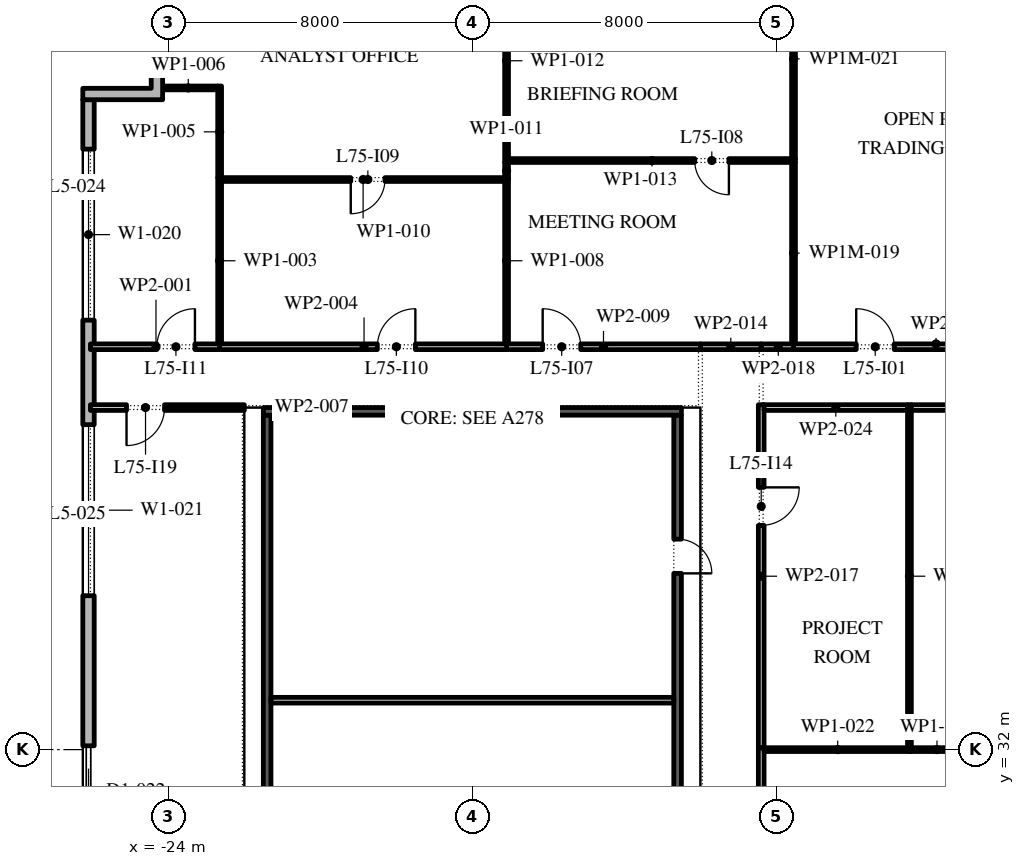
"""IFC4 building model, lengths in metres.
Left out: names, types, materials, properties, quantities, classifications, styles, units other than length and angle.
Written with IfcOpenShell. Run it as: python <this file> out.ifc"""

import sys

from ifc_helpers import new_model, si_unit, direction, frame, frame_2d, origin, place, context, subcontext, project, spatial, polyline, rectangle, outline, extrude, element, fill, save


model = new_model("IFC4")
c1 = context("Model", 3, precision=1e-05, world=origin(), true_north=direction((0.0, 1.0)))
c2 = subcontext(c1, "Body", "Model", "MODEL_VIEW")
j1 = project(units=[si_unit("LENGTHUNIT", "METRE"), si_unit("PLANEANGLEUNIT", "RADIAN")], contexts=[c1])
p1 = place(None, origin())
s1 = spatial("IfcSite", under=j1, at=p1, CompositionType="ELEMENT")
p2 = place(p1, origin())
s2 = spatial("IfcBuilding", under=s1, at=p2, CompositionType="ELEMENT")
p3 = place(p2, frame((0.0, 0.0, 342.6)))
s3 = spatial("IfcBuildingStorey", under=s2, at=p3, CompositionType="ELEMENT", Elevation=342.6)
p4 = place(p3, frame((-26.1, 49.1, 0.0), z_axis=(0.0, 0.0, 1.0), x_axis=(0.0, -1.0, 0.0)))
e1 = element("IfcWall", 1, at=p4, inside=s3, PredefinedType="STANDARD", context=c2, shape_type="SweptSolid", body=[
    extrude(rectangle(XDim=51.5, YDim=0.3, at=frame_2d((25.75, 0.0))), origin(), (0.0, 0.0, 1.0), 4.0),
])
p5 = place(p4, frame((1.3, 0.0, 0.45)))
e2 = element("IfcOpeningElement", 2, at=p5, cuts=e1, PredefinedType="OPENING", context=c2, shape_type="SweptSolid", body=[
    extrude(rectangle(XDim=4.5, YDim=3.05, at=frame_2d((2.25, 1.525))), frame((0.0, 0.16, 0.0), z_axis=(0.0, -1.0, 0.0), x_axis=(1.0, 0.0, 0.0)), (0.0, 0.0, 1.0), 0.32),
])
p6 = place(p4, frame((8.55, 0.0, 0.45)))
e3 = element("IfcOpeningElement", 3, at=p6, cuts=e1, PredefinedType="OPENING", context=c2, shape_type="SweptSolid", body=[
    extrude(rectangle(XDim=4.5, YDim=3.05, at=frame_2d((2.25, 1.525))), frame((0.0, 0.16, 0.0), z_axis=(0.0, -1.0, 0.0), x_axis=(1.0, 0.0, 0.0)), (0.0, 0.0, 1.0), 0.32),
])
p7 = place(p4, frame((17.0, 0.0, 0.0)))
e4 = element("IfcOpeningElement", 4, at=p7, cuts=e1, PredefinedType="OPENING", context=c2, shape_type="SweptSolid", body=[
    extrude(rectangle(XDim=2.4, YDim=3.5, at=frame_2d((1.2, 1.75))), frame((0.0, 0.16, 0.0), z_axis=(0.0, -1.0, 0.0), x_axis=(1.0, 0.0, 0.0)), (0.0, 0.0, 1.0), 0.32),
])
p8 = place(p4, frame((23.35, 0.0, 0.45)))
e5 = element("IfcOpeningElement", 5, at=p8, cuts=e1, PredefinedType="OPENING", context=c2, shape_type="SweptSolid", body=[
    extrude(rectangle(XDim=4.5, YDim=3.05, at=frame_2d((2.25, 1.525))), frame((0.0, 0.16, 0.0), z_axis=(0.0, -1.0, 0.0), x_axis=(1.0, 0.0, 0.0)), (0.0, 0.0, 1.0), 0.32),
])
p9 = place(p4, frame((30.75, 0.0, 0.45)))
e6 = element("IfcOpeningElement", 6, at=p9, cuts=e1, PredefinedType="OPENING", context=c2, shape_type="SweptSolid", body=[
    extrude(rectangle(XDim=4.5, YDim=3.05, at=frame_2d((2.25, 1.525))), frame((0.0, 0.16, 0.0), z_axis=(0.0, -1.0, 0.0), x_axis=(1.0, 0.0, 0.0)), (0.0, 0.0, 1.0), 0.32),
])
p10 = place(p4, frame((38.15, 0.0, 0.45)))
e7 = element("IfcOpeningElement", 7, at=p10, cuts=e1, PredefinedType="OPENING", context=c2, shape_type="SweptSolid", body=[
    extrude(rectangle(XDim=4.5, YDim=3.05, at=frame_2d((2.25, 1.525))), frame((0.0, 0.16, 0.0), z_axis=(0.0, -1.0, 0.0), x_axis=(1.0, 0.0, 0.0)), (0.0, 0.0, 1.0), 0.32),
])
p11 = place(p4, frame((46.6, 0.0, 0.0)))
e8 = element("IfcOpeningElement", 8, at=p11, cuts=e1, PredefinedType="OPENING", context=c2, shape_type="SweptSolid", body=[
    extrude(rectangle(XDim=2.4, YDim=3.5, at=frame_2d((1.2, 1.75))), frame((0.0, 0.16, 0.0), z_axis=(0.0, -1.0, 0.0), x_axis=(1.0, 0.0, 0.0)), (0.0, 0.0, 1.0), 0.32),
])
p12 = place(p3, origin())
e9 = element("IfcWall", 9, at=p12, inside=s3, PredefinedType="STANDARD", context=c2, shape_type="SweptSolid", body=[
    extrude(outline(polyline([(-24.45, 49.4), (-24.45, 51.2), (-22.65, 51.2), (-22.65, 52.7), (-22.35, 52.7), (-22.35, 50.9), (-24.15, 50.9), (-24.15, 49.1), (-26.25, 49.1), (-26.25, 49.4), (-24.45, 49.4)])), origin(), (0.0, 0.0, 1.0), 4.0),
])
p13 = place(p3, frame((-21.4, 25.75, 0.0), z_axis=(0.0, 0.0, 1.0), x_axis=(0.0, 1.0, 0.0)))
e10 = element("IfcWall", 10, at=p13, inside=s3, PredefinedType="SHEAR", context=c2, shape_type="SweptSolid", body=[
    extrude(rectangle(XDim=15.05, YDim=0.2, at=frame_2d((7.525, 0.0))), origin(), (0.0, 0.0, 1.0), 4.0),
])
p14 = place(p3, frame((-10.6, 25.75, 0.0), z_axis=(0.0, 0.0, 1.0), x_axis=(0.0, 1.0, 0.0)))
e11 = element("IfcWall", 11, at=p14, inside=s3, PredefinedType="SHEAR", context=c2, shape_type="SweptSolid", body=[
    extrude(rectangle(XDim=15.05, YDim=0.2, at=frame_2d((7.525, 0.0))), origin(), (0.0, 0.0, 1.0), 4.0),
])
p15 = place(p14, frame((3.288, 0.0, 0.0)))
e12 = element("IfcOpeningElement", 12, at=p15, cuts=e11, PredefinedType="OPENING", context=c2, shape_type="SweptSolid", body=[
    extrude(rectangle(XDim=0.9, YDim=2.1, at=frame_2d((0.45, 1.05))), frame((0.0, 0.11, 0.0), z_axis=(0.0, -1.0, 0.0), x_axis=(1.0, 0.0, 0.0)), (0.0, 0.0, 1.0), 0.22),
])
p16 = place(p14, frame((10.887, 0.0, 0.0)))
e13 = element("IfcOpeningElement", 13, at=p16, cuts=e11, PredefinedType="OPENING", context=c2, shape_type="SweptSolid", body=[
    extrude(rectangle(XDim=0.9, YDim=2.1, at=frame_2d((0.45, 1.05))), frame((0.0, 0.11, 0.0), z_axis=(0.0, -1.0, 0.0), x_axis=(1.0, 0.0, 0.0)), (0.0, 0.0, 1.0), 0.22),
])
p17 = place(p3, frame((-21.5, 40.9, 0.0), z_axis=(0.0, 0.0, 1.0), x_axis=(1.0, 0.0, 0.0)))
e14 = element("IfcWall", 14, at=p17, inside=s3, PredefinedType="SHEAR", context=c2, shape_type="SweptSolid", body=[
    extrude(rectangle(XDim=11.0, YDim=0.2, at=frame_2d((5.5, 0.0))), origin(), (0.0, 0.0, 1.0), 4.0),
])
p18 = place(p3, frame((-21.3, 33.3, 0.0), z_axis=(0.0, 0.0, 1.0), x_axis=(1.0, 0.0, 0.0)))
e15 = element("IfcWall", 15, at=p18, inside=s3, PredefinedType="PARTITIONING", context=c2, shape_type="SweptSolid", body=[
    extrude(rectangle(XDim=10.6, YDim=0.15, at=frame_2d((5.3, 0.0))), origin(), (0.0, 0.0, 1.0), 4.0),
])
p19 = place(p3, frame((-26.05, 42.6, 0.0), z_axis=(0.0, 0.0, 1.0), x_axis=(1.0, 0.0, 0.0)))
e16 = element("IfcWall", 16, at=p19, inside=s3, PredefinedType="PARTITIONING", context=c2, shape_type="SweptSolid", body=[
    extrude(rectangle(XDim=3.45, YDim=0.15, at=frame_2d((1.725, 0.0))), origin(), (0.0, 0.0, 1.0), 4.0),
])
p20 = place(p19, frame((1.75, 0.0, 0.0)))
e17 = element("IfcOpeningElement", 17, at=p20, cuts=e16, PredefinedType="OPENING", context=c2, shape_type="SweptSolid", body=[
    extrude(rectangle(XDim=1.0, YDim=2.1, at=frame_2d((0.5, 1.05))), frame((0.0, 0.085, 0.0), z_axis=(0.0, -1.0, 0.0), x_axis=(1.0, 0.0, 0.0)), (0.0, 0.0, 1.0), 0.17),
])
p21 = place(p3, frame((-22.65, 42.675, 0.0), z_axis=(0.0, 0.0, 1.0), x_axis=(0.0, 1.0, 0.0)))
e18 = element("IfcWall", 18, at=p21, inside=s3, PredefinedType="PARTITIONING", context=c2, shape_type="SweptSolid", body=[
    extrude(rectangle(XDim=4.375, YDim=0.1, at=frame_2d((2.188, 0.0))), origin(), (0.0, 0.0, 1.0), 4.0),
])
p22 = place(p3, frame((-22.65, 42.6, 0.0), z_axis=(0.0, 0.0, 1.0), x_axis=(1.0, 0.0, 0.0)))
e19 = element("IfcWall", 19, at=p22, inside=s3, PredefinedType="PARTITIONING", context=c2, shape_type="SweptSolid", body=[
    extrude(rectangle(XDim=7.6, YDim=0.15, at=frame_2d((3.8, 0.0))), origin(), (0.0, 0.0, 1.0), 4.0),
])
p23 = place(p22, frame((4.15, 0.0, 0.0)))
e20 = element("IfcOpeningElement", 20, at=p23, cuts=e19, PredefinedType="OPENING", context=c2, shape_type="SweptSolid", body=[
    extrude(rectangle(XDim=1.0, YDim=2.1, at=frame_2d((0.5, 1.05))), frame((0.0, 0.085, 0.0), z_axis=(0.0, -1.0, 0.0), x_axis=(1.0, 0.0, 0.0)), (0.0, 0.0, 1.0), 0.17),
])
p24 = place(p3, frame((-22.65, 47.05, 0.0), z_axis=(0.0, 0.0, 1.0), x_axis=(0.0, 1.0, 0.0)))
e21 = element("IfcWall", 21, at=p24, inside=s3, PredefinedType="PARTITIONING", context=c2, shape_type="SweptSolid", body=[
    extrude(rectangle(XDim=2.41, YDim=0.1, at=frame_2d((1.205, 0.0))), origin(), (0.0, 0.0, 1.0), 4.0),
])
p25 = place(p3, frame((-22.7, 49.41, 0.0), z_axis=(0.0, 0.0, 1.0), x_axis=(-1.0, 0.0, 0.0)))
e22 = element("IfcWall", 22, at=p25, inside=s3, PredefinedType="PARTITIONING", context=c2, shape_type="SweptSolid", body=[
    extrude(rectangle(XDim=1.55, YDim=0.1, at=frame_2d((0.775, 0.0))), origin(), (0.0, 0.0, 1.0), 4.0),
])
p26 = place(p3, frame((-22.0, 41.0, 0.0), z_axis=(0.0, 0.0, 1.0), x_axis=(-1.0, 0.0, 0.0)))
e23 = element("IfcWall", 23, at=p26, inside=s3, PredefinedType="PARTITIONING", context=c2, shape_type="SweptSolid", body=[
    extrude(rectangle(XDim=4.05, YDim=0.15, at=frame_2d((2.025, 0.0))), origin(), (0.0, 0.0, 1.0), 4.0),
])
p27 = place(p26, frame((2.1, 0.0, 0.0)))
e24 = element("IfcOpeningElement", 24, at=p27, cuts=e23, PredefinedType="OPENING", context=c2, shape_type="SweptSolid", body=[
    extrude(rectangle(XDim=1.0, YDim=2.1, at=frame_2d((0.5, 1.05))), frame((0.0, 0.085, 0.0), z_axis=(0.0, -1.0, 0.0), x_axis=(1.0, 0.0, 0.0)), (0.0, 0.0, 1.0), 0.17),
])
p28 = place(p3, frame((-15.1, 42.675, 0.0), z_axis=(0.0, 0.0, 1.0), x_axis=(0.0, 1.0, 0.0)))
e25 = element("IfcWall", 25, at=p28, inside=s3, PredefinedType="PARTITIONING", context=c2, shape_type="SweptSolid", body=[
    extrude(rectangle(XDim=4.375, YDim=0.1, at=frame_2d((2.188, 0.0))), origin(), (0.0, 0.0, 1.0), 4.0),
])
p29 = place(p3, frame((-15.1, 42.6, 0.0), z_axis=(0.0, 0.0, 1.0), x_axis=(1.0, 0.0, 0.0)))
e26 = element("IfcWall", 26, at=p29, inside=s3, PredefinedType="PARTITIONING", context=c2, shape_type="SweptSolid", body=[
    extrude(rectangle(XDim=5.1, YDim=0.15, at=frame_2d((2.55, 0.0))), origin(), (0.0, 0.0, 1.0), 4.0),
])
p30 = place(p29, frame((0.95, 0.0, 0.0)))
e27 = element("IfcOpeningElement", 27, at=p30, cuts=e26, PredefinedType="OPENING", context=c2, shape_type="SweptSolid", body=[
    extrude(rectangle(XDim=1.0, YDim=2.1, at=frame_2d((0.5, 1.05))), frame((0.0, 0.085, 0.0), z_axis=(0.0, -1.0, 0.0), x_axis=(1.0, 0.0, 0.0)), (0.0, 0.0, 1.0), 0.17),
])
p31 = place(p3, frame((-15.15, 47.0, 0.0), z_axis=(0.0, 0.0, 1.0), x_axis=(-1.0, 0.0, 0.0)))
e28 = element("IfcWall", 28, at=p31, inside=s3, PredefinedType="PARTITIONING", context=c2, shape_type="SweptSolid", body=[
    extrude(rectangle(XDim=7.45, YDim=0.1, at=frame_2d((3.725, 0.0))), origin(), (0.0, 0.0, 1.0), 4.0),
])
p32 = place(p31, frame((3.15, 0.0, 0.0)))
e29 = element("IfcOpeningElement", 29, at=p32, cuts=e28, PredefinedType="OPENING", context=c2, shape_type="SweptSolid", body=[
    extrude(rectangle(XDim=0.9, YDim=2.1, at=frame_2d((0.45, 1.05))), frame((0.0, 0.06, 0.0), z_axis=(0.0, -1.0, 0.0), x_axis=(1.0, 0.0, 0.0)), (0.0, 0.0, 1.0), 0.12),
])
p33 = place(p3, frame((-15.1, 47.0, 0.0), z_axis=(0.0, 0.0, 1.0), x_axis=(0.0, 1.0, 0.0)))
e30 = element("IfcWall", 30, at=p33, inside=s3, PredefinedType="PARTITIONING", context=c2, shape_type="SweptSolid", body=[
    extrude(rectangle(XDim=0.45, YDim=0.1, at=frame_2d((0.225, 0.0))), origin(), (0.0, 0.0, 1.0), 4.0),
])
p34 = place(p3, frame((-15.1, 47.45, 0.0), z_axis=(0.0, 0.0, 1.0), x_axis=(0.0, 1.0, 0.0)))
e31 = element("IfcWall", 31, at=p34, inside=s3, PredefinedType="PARTITIONING", context=c2, shape_type="SweptSolid", body=[
    extrude(rectangle(XDim=5.35, YDim=0.1, at=frame_2d((2.675, 0.0))), origin(), (0.0, 0.0, 1.0), 4.0),
])
p35 = place(p3, frame((-15.05, 47.5, 0.0), z_axis=(0.0, 0.0, 1.0), x_axis=(1.0, 0.0, 0.0)))
e32 = element("IfcWall", 32, at=p35, inside=s3, PredefinedType="PARTITIONING", context=c2, shape_type="SweptSolid", body=[
    extrude(rectangle(XDim=7.55, YDim=0.1, at=frame_2d((3.775, 0.0))), origin(), (0.0, 0.0, 1.0), 4.0),
])
p36 = place(p35, frame((4.9, 0.0, 0.0)))
e33 = element("IfcOpeningElement", 33, at=p36, cuts=e32, PredefinedType="OPENING", context=c2, shape_type="SweptSolid", body=[
    extrude(rectangle(XDim=0.9, YDim=2.1, at=frame_2d((0.45, 1.05))), frame((0.0, 0.06, 0.0), z_axis=(0.0, -1.0, 0.0), x_axis=(1.0, 0.0, 0.0)), (0.0, 0.0, 1.0), 0.12),
])
p37 = place(p3, frame((-10.0, 42.6, 0.0), z_axis=(0.0, 0.0, 1.0), x_axis=(1.0, 0.0, 0.0)))
e34 = element("IfcWall", 34, at=p37, inside=s3, PredefinedType="PARTITIONING", context=c2, shape_type="SweptSolid", body=[
    extrude(rectangle(XDim=1.6, YDim=0.15, at=frame_2d((0.8, 0.0))), origin(), (0.0, 0.0, 1.0), 4.0),
])
p38 = place(p3, frame((-8.4, 32.05, 0.0), z_axis=(0.0, 0.0, 1.0), x_axis=(0.0, -1.0, 0.0)))
e35 = element("IfcWall", 35, at=p38, inside=s3, PredefinedType="PARTITIONING", context=c2, shape_type="SweptSolid", body=[
    extrude(rectangle(XDim=12.975, YDim=0.15, at=frame_2d((6.488, 0.0))), origin(), (0.0, 0.0, 1.0), 4.0),
])
p39 = place(p38, frame((3.4, 0.0, 0.0)))
e36 = element("IfcOpeningElement", 36, at=p39, cuts=e35, PredefinedType="OPENING", context=c2, shape_type="SweptSolid", body=[
    extrude(rectangle(XDim=1.0, YDim=2.1, at=frame_2d((0.5, 1.05))), frame((0.0, 0.085, 0.0), z_axis=(0.0, -1.0, 0.0), x_axis=(1.0, 0.0, 0.0)), (0.0, 0.0, 1.0), 0.17),
])
p40 = place(p3, frame((-8.4, 41.075, 0.0), z_axis=(0.0, 0.0, 1.0), x_axis=(0.0, -1.0, 0.0)))
e37 = element("IfcWall", 37, at=p40, inside=s3, PredefinedType="PARTITIONING", context=c2, shape_type="SweptSolid", body=[
    extrude(rectangle(XDim=9.025, YDim=0.15, at=frame_2d((4.512, 0.0))), origin(), (0.0, 0.0, 1.0), 4.0),
])
p41 = place(p40, frame((2.175, 0.0, 0.0)))
e38 = element("IfcOpeningElement", 38, at=p41, cuts=e37, PredefinedType="OPENING", context=c2, shape_type="SweptSolid", body=[
    extrude(rectangle(XDim=1.0, YDim=2.1, at=frame_2d((0.5, 1.05))), frame((0.0, 0.085, 0.0), z_axis=(0.0, -1.0, 0.0), x_axis=(1.0, 0.0, 0.0)), (0.0, 0.0, 1.0), 0.17),
])
p42 = place(p3, frame((-8.4, 42.6, 0.0), z_axis=(0.0, 0.0, 1.0), x_axis=(1.0, 0.0, 0.0)))
e39 = element("IfcWall", 39, at=p42, inside=s3, PredefinedType="PARTITIONING", context=c2, shape_type="SweptSolid", body=[
    extrude(rectangle(XDim=0.9, YDim=0.15, at=frame_2d((0.45, 0.0))), origin(), (0.0, 0.0, 1.0), 4.0),
])
p43 = place(p3, frame((-7.55, 42.675, 0.0), z_axis=(0.0, 0.0, 1.0), x_axis=(0.0, 1.0, 0.0)))
e40 = element("IfcWall", 40, at=p43, inside=s3, PredefinedType="PARTITIONING", context=c2, shape_type="SweptSolid", body=[
    extrude(rectangle(XDim=4.775, YDim=0.1, at=frame_2d((2.387, 0.0))), origin(), (0.0, 0.0, 1.0), 3.096),
])
p44 = place(p3, frame((-7.55, 42.6, 0.0), z_axis=(0.0, 0.0, 1.0), x_axis=(1.0, 0.0, 0.0)))
e41 = element("IfcWall", 41, at=p44, inside=s3, PredefinedType="PARTITIONING", context=c2, shape_type="SweptSolid", body=[
    extrude(rectangle(XDim=7.5, YDim=0.15, at=frame_2d((3.75, 0.0))), origin(), (0.0, 0.0, 1.0), 4.0),
])
p45 = place(p44, frame((1.65, 0.0, 0.0)))
e42 = element("IfcOpeningElement", 42, at=p45, cuts=e41, PredefinedType="OPENING", context=c2, shape_type="SweptSolid", body=[
    extrude(rectangle(XDim=1.0, YDim=2.1, at=frame_2d((0.5, 1.05))), frame((0.0, 0.085, 0.0), z_axis=(0.0, -1.0, 0.0), x_axis=(1.0, 0.0, 0.0)), (0.0, 0.0, 1.0), 0.17),
])
p46 = place(p3, frame((-7.55, 47.55, 0.0), z_axis=(0.0, 0.0, 1.0), x_axis=(0.0, 1.0, 0.0)))
e43 = element("IfcWall", 43, at=p46, inside=s3, PredefinedType="PARTITIONING", context=c2, shape_type="SweptSolid", body=[
    extrude(rectangle(XDim=5.25, YDim=0.1, at=frame_2d((2.625, 0.0))), origin(), (0.0, 0.0, 1.0), 3.096),
])
p47 = place(p3, frame((-4.45, 32.0, 0.0), z_axis=(0.0, 0.0, 1.0), x_axis=(-1.0, 0.0, 0.0)))
e44 = element("IfcWall", 44, at=p47, inside=s3, PredefinedType="PARTITIONING", context=c2, shape_type="SweptSolid", body=[
    extrude(rectangle(XDim=3.875, YDim=0.1, at=frame_2d((1.938, 0.0))), origin(), (0.0, 0.0, 1.0), 4.0),
])
p48 = place(p3, frame((-4.5, 32.05, 0.0), z_axis=(0.0, 0.0, 1.0), x_axis=(0.0, 1.0, 0.0)))
e45 = element("IfcWall", 45, at=p48, inside=s3, PredefinedType="PARTITIONING", context=c2, shape_type="SweptSolid", body=[
    extrude(rectangle(XDim=9.025, YDim=0.1, at=frame_2d((4.512, 0.0))), origin(), (0.0, 0.0, 1.0), 4.0),
])
p49 = place(p3, frame((-4.55, 41.0, 0.0), z_axis=(0.0, 0.0, 1.0), x_axis=(-1.0, 0.0, 0.0)))
e46 = element("IfcWall", 46, at=p49, inside=s3, PredefinedType="PARTITIONING", context=c2, shape_type="SweptSolid", body=[
    extrude(rectangle(XDim=3.775, YDim=0.15, at=frame_2d((1.887, 0.0))), origin(), (0.0, 0.0, 1.0), 4.0),
])
p50 = place(p3, frame((-3.05, 32.0, 0.0), z_axis=(0.0, 0.0, 1.0), x_axis=(-1.0, 0.0, 0.0)))
e47 = element("IfcWall", 47, at=p50, inside=s3, PredefinedType="PARTITIONING", context=c2, shape_type="SweptSolid", body=[
    extrude(rectangle(XDim=1.45, YDim=0.1, at=frame_2d((0.725, 0.0))), origin(), (0.0, 0.0, 1.0), 4.0),
])
p51 = place(p3, frame((1.45, 41.0, 0.0), z_axis=(0.0, 0.0, 1.0), x_axis=(-1.0, 0.0, 0.0)))
e48 = element("IfcWall", 48, at=p51, inside=s3, PredefinedType="PARTITIONING", context=c2, shape_type="SweptSolid", body=[
    extrude(rectangle(XDim=5.9, YDim=0.15, at=frame_2d((2.95, 0.0))), origin(), (0.0, 0.0, 1.0), 4.0),
])
p52 = place(p51, frame((1.3, 0.0, 0.0)))
e49 = element("IfcOpeningElement", 49, at=p52, cuts=e48, PredefinedType="OPENING", context=c2, shape_type="SweptSolid", body=[
    extrude(rectangle(XDim=1.0, YDim=2.1, at=frame_2d((0.5, 1.05))), frame((0.0, 0.085, 0.0), z_axis=(0.0, -1.0, 0.0), x_axis=(1.0, 0.0, 0.0)), (0.0, 0.0, 1.0), 0.17),
])
p53 = place(p5, origin())
e50 = element("IfcWindow", 50, at=p53, inside=s3, PartitioningType="DOUBLE_PANEL_VERTICAL", PredefinedType="WINDOW", context=c2, shape_type="SweptSolid", body=[
    extrude(rectangle(XDim=4.5, YDim=3.05, at=frame_2d((2.25, 1.525))), frame((0.0, 0.03, 0.0), z_axis=(0.0, -1.0, 0.0), x_axis=(1.0, 0.0, 0.0)), (0.0, 0.0, 1.0), 0.06),
])
fill(e2, e50)
p54 = place(p6, origin())
e51 = element("IfcWindow", 51, at=p54, inside=s3, PartitioningType="DOUBLE_PANEL_VERTICAL", PredefinedType="WINDOW", context=c2, shape_type="SweptSolid", body=[
    extrude(rectangle(XDim=4.5, YDim=3.05, at=frame_2d((2.25, 1.525))), frame((0.0, 0.03, 0.0), z_axis=(0.0, -1.0, 0.0), x_axis=(1.0, 0.0, 0.0)), (0.0, 0.0, 1.0), 0.06),
])
fill(e3, e51)
p55 = place(p7, origin())
e52 = element("IfcDoor", 52, at=p55, inside=s3, OperationType="DOUBLE_DOOR_SLIDING", PredefinedType="DOOR", context=c2, shape_type="SweptSolid", body=[
    extrude(rectangle(XDim=2.4, YDim=3.5, at=frame_2d((1.2, 1.75))), frame((0.0, 0.025, 0.0), z_axis=(0.0, -1.0, 0.0), x_axis=(1.0, 0.0, 0.0)), (0.0, 0.0, 1.0), 0.05),
])
fill(e4, e52)
p56 = place(p16, frame((0.9, 0.15, 0.0), z_axis=(0.0, 0.0, 1.0), x_axis=(-1.0, 0.0, 0.0)))
e53 = element("IfcDoor", 53, at=p56, inside=s3, OperationType="SINGLE_SWING_LEFT", PredefinedType="DOOR", context=c2, shape_type="SweptSolid", body=[
    extrude(rectangle(XDim=0.9, YDim=2.1, at=frame_2d((0.45, 1.05))), frame((0.0, 0.1, 0.0), z_axis=(0.0, -1.0, 0.0), x_axis=(1.0, 0.0, 0.0)), (0.0, 0.0, 1.0), 0.05),
])
fill(e13, e53)
p57 = place(p45, origin())
e54 = element("IfcDoor", 54, at=p57, inside=s3, OperationType="SINGLE_SWING_RIGHT", PredefinedType="DOOR", context=c2, shape_type="SweptSolid", body=[
    extrude(rectangle(XDim=1.0, YDim=2.1, at=frame_2d((0.5, 1.05))), frame((0.0, 0.025, 0.0), z_axis=(0.0, -1.0, 0.0), x_axis=(1.0, 0.0, 0.0)), (0.0, 0.0, 1.0), 0.05),
])
fill(e42, e54)
p58 = place(p30, origin())
e55 = element("IfcDoor", 55, at=p58, inside=s3, OperationType="SINGLE_SWING_RIGHT", PredefinedType="DOOR", context=c2, shape_type="SweptSolid", body=[
    extrude(rectangle(XDim=1.0, YDim=2.1, at=frame_2d((0.5, 1.05))), frame((0.0, 0.025, 0.0), z_axis=(0.0, -1.0, 0.0), x_axis=(1.0, 0.0, 0.0)), (0.0, 0.0, 1.0), 0.05),
])
fill(e27, e55)
p59 = place(p36, frame((0.9, 0.0, 0.0), z_axis=(0.0, 0.0, 1.0), x_axis=(-1.0, 0.0, 0.0)))
e56 = element("IfcDoor", 56, at=p59, inside=s3, OperationType="SINGLE_SWING_RIGHT", PredefinedType="DOOR", context=c2, shape_type="SweptSolid", body=[
    extrude(rectangle(XDim=0.9, YDim=2.1, at=frame_2d((0.45, 1.05))), frame((0.0, 0.025, 0.0), z_axis=(0.0, -1.0, 0.0), x_axis=(1.0, 0.0, 0.0)), (0.0, 0.0, 1.0), 0.05),
])
fill(e33, e56)
p60 = place(p32, origin())
e57 = element("IfcDoor", 57, at=p60, inside=s3, OperationType="SINGLE_SWING_LEFT", PredefinedType="DOOR", context=c2, shape_type="SweptSolid", body=[
    extrude(rectangle(XDim=0.9, YDim=2.1, at=frame_2d((0.45, 1.05))), frame((0.0, 0.025, 0.0), z_axis=(0.0, -1.0, 0.0), x_axis=(1.0, 0.0, 0.0)), (0.0, 0.0, 1.0), 0.05),
])
fill(e29, e57)
p61 = place(p23, origin())
e58 = element("IfcDoor", 58, at=p61, inside=s3, OperationType="SINGLE_SWING_LEFT", PredefinedType="DOOR", context=c2, shape_type="SweptSolid", body=[
    extrude(rectangle(XDim=1.0, YDim=2.1, at=frame_2d((0.5, 1.05))), frame((0.0, 0.025, 0.0), z_axis=(0.0, -1.0, 0.0), x_axis=(1.0, 0.0, 0.0)), (0.0, 0.0, 1.0), 0.05),
])
fill(e20, e58)
p62 = place(p20, origin())
e59 = element("IfcDoor", 59, at=p62, inside=s3, OperationType="SINGLE_SWING_LEFT", PredefinedType="DOOR", context=c2, shape_type="SweptSolid", body=[
    extrude(rectangle(XDim=1.0, YDim=2.1, at=frame_2d((0.5, 1.05))), frame((0.0, 0.025, 0.0), z_axis=(0.0, -1.0, 0.0), x_axis=(1.0, 0.0, 0.0)), (0.0, 0.0, 1.0), 0.05),
])
fill(e17, e59)
p63 = place(p41, origin())
e60 = element("IfcDoor", 60, at=p63, inside=s3, OperationType="SINGLE_SWING_RIGHT", PredefinedType="DOOR", context=c2, shape_type="SweptSolid", body=[
    extrude(rectangle(XDim=1.0, YDim=2.1, at=frame_2d((0.5, 1.05))), frame((0.0, 0.025, 0.0), z_axis=(0.0, -1.0, 0.0), x_axis=(1.0, 0.0, 0.0)), (0.0, 0.0, 1.0), 0.05),
])
fill(e38, e60)
p64 = place(p27, origin())
e61 = element("IfcDoor", 61, at=p64, inside=s3, OperationType="SINGLE_SWING_LEFT", PredefinedType="DOOR", context=c2, shape_type="SweptSolid", body=[
    extrude(rectangle(XDim=1.0, YDim=2.1, at=frame_2d((0.5, 1.05))), frame((0.0, 0.025, 0.0), z_axis=(0.0, -1.0, 0.0), x_axis=(1.0, 0.0, 0.0)), (0.0, 0.0, 1.0), 0.05),
])
fill(e24, e61)
save(model, sys.argv[1])
